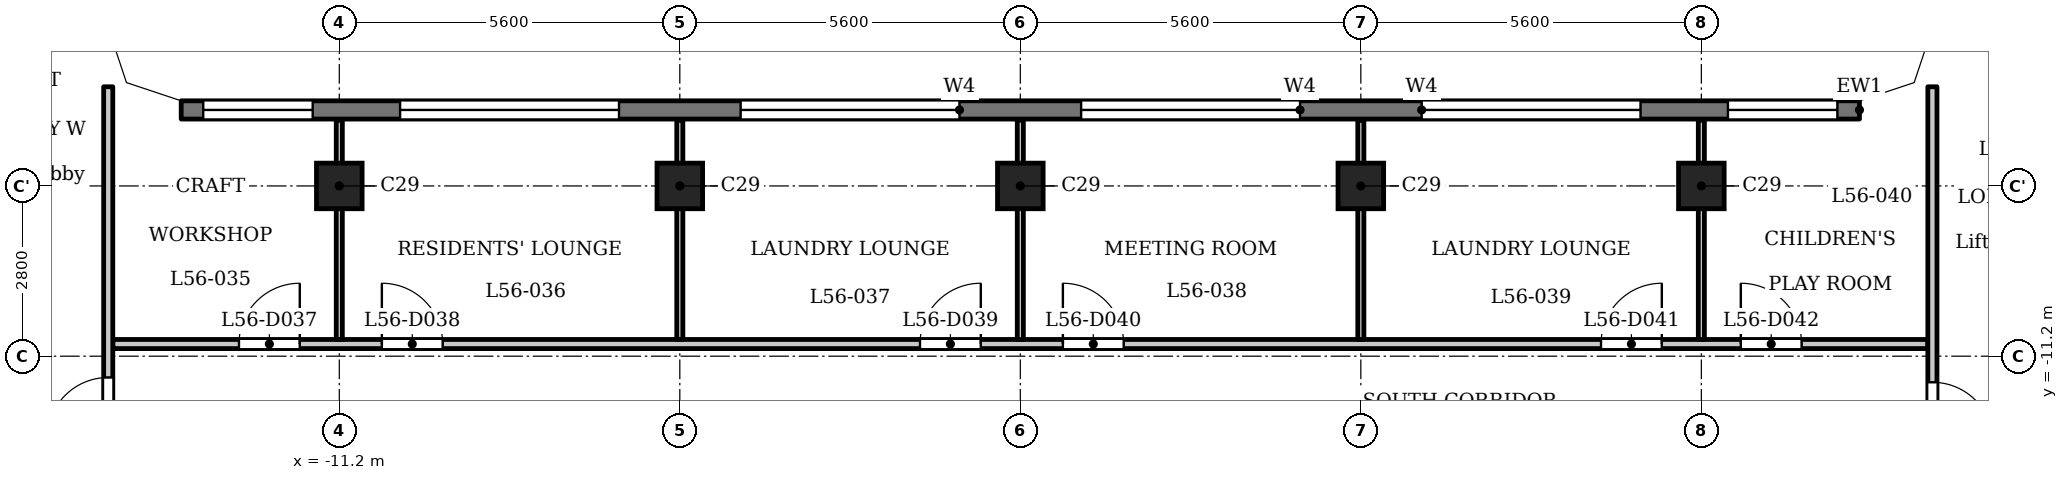
"""IFC4 building model, lengths in metres.
Left out: names, types, materials, properties, quantities, classifications, styles, units other than length and angle.
Written with IfcOpenShell. Run it as: python <this file> out.ifc"""

import sys

from ifc_helpers import new_model, si_unit, direction, frame, frame_2d, origin, origin_2d, place, context, subcontext, project, spatial, polyline, rectangle, outline, extrude, element, fill, save


model = new_model("IFC4")
c1 = context("Model", 3, precision=1e-05, world=origin(), true_north=direction((0.0, 1.0)))
c2 = subcontext(c1, "Body", "Model", "MODEL_VIEW")
j1 = project(units=[si_unit("LENGTHUNIT", "METRE"), si_unit("PLANEANGLEUNIT", "RADIAN")], contexts=[c1])
p1 = place(None, origin())
s1 = spatial("IfcSite", under=j1, at=p1, CompositionType="ELEMENT")
p2 = place(p1, origin())
s2 = spatial("IfcBuilding", under=s1, at=p2, CompositionType="ELEMENT")
p3 = place(p2, frame((0.0, 0.0, 216.9)))
s3 = spatial("IfcBuildingStorey", under=s2, at=p3, CompositionType="ELEMENT", Elevation=216.9)
for number, where, z_axis, x_axis in (
    (1, (-11.2, -8.4, 0.0), (0.0, 0.0, 1.0), (1.0, 0.0, 0.0)),
    (2, (-5.6, -8.4, 0.0), (0.0, 0.0, 1.0), (1.0, 0.0, 0.0)),
    (3, (0.0, -8.4, 0.0), (0.0, 0.0, 1.0), (1.0, 0.0, 0.0)),
    (4, (5.6, -8.4, 0.0), (0.0, 0.0, 1.0), (1.0, 0.0, 0.0)),
    (5, (11.2, -8.4, 0.0), (0.0, 0.0, 1.0), (1.0, 0.0, 0.0)),
):
    element("IfcColumn", number, at=place(p3, frame(where, z_axis=z_axis, x_axis=x_axis)), inside=s3, PredefinedType="COLUMN", context=c2, shape_type="SweptSolid", body=[
        extrude(rectangle(XDim=0.75, YDim=0.75, at=origin_2d()), origin(), (0.0, 0.0, 1.0), 3.5),
    ])
p4 = place(p3, frame((13.8, -7.15, 0.0), z_axis=(0.0, 0.0, 1.0), x_axis=(-1.0, 0.0, 0.0)))
e6 = element("IfcWall", 6, at=p4, inside=s3, PredefinedType="SOLIDWALL", context=c2, shape_type="SweptSolid", body=[
    extrude(rectangle(XDim=27.6, YDim=0.3, at=frame_2d((13.8, 0.0))), origin(), (0.0, 0.0, 1.0), 3.2),
])
p5 = place(p4, frame((0.363, 0.0, 0.9)))
e7 = element("IfcOpeningElement", 7, at=p5, cuts=e6, PredefinedType="OPENING", context=c2, shape_type="SweptSolid", body=[
    extrude(rectangle(XDim=1.8, YDim=1.25, at=frame_2d((0.9, 0.625))), frame((0.0, 0.16, 0.0), z_axis=(0.0, -1.0, 0.0), x_axis=(1.0, 0.0, 0.0)), (0.0, 0.0, 1.0), 0.32),
])
p6 = place(p4, frame((3.6, 0.0, 1.2)))
e8 = element("IfcOpeningElement", 8, at=p6, cuts=e6, PredefinedType="OPENING", context=c2, shape_type="SweptSolid", body=[
    extrude(rectangle(XDim=3.6, YDim=0.95, at=frame_2d((1.8, 0.475))), frame((0.0, 0.16, 0.0), z_axis=(0.0, -1.0, 0.0), x_axis=(1.0, 0.0, 0.0)), (0.0, 0.0, 1.0), 0.32),
])
p7 = place(p4, frame((9.2, 0.0, 1.2)))
e9 = element("IfcOpeningElement", 9, at=p7, cuts=e6, PredefinedType="OPENING", context=c2, shape_type="SweptSolid", body=[
    extrude(rectangle(XDim=3.6, YDim=0.95, at=frame_2d((1.8, 0.475))), frame((0.0, 0.16, 0.0), z_axis=(0.0, -1.0, 0.0), x_axis=(1.0, 0.0, 0.0)), (0.0, 0.0, 1.0), 0.32),
])
p8 = place(p4, frame((14.8, 0.0, 1.2)))
e10 = element("IfcOpeningElement", 10, at=p8, cuts=e6, PredefinedType="OPENING", context=c2, shape_type="SweptSolid", body=[
    extrude(rectangle(XDim=3.6, YDim=0.95, at=frame_2d((1.8, 0.475))), frame((0.0, 0.16, 0.0), z_axis=(0.0, -1.0, 0.0), x_axis=(1.0, 0.0, 0.0)), (0.0, 0.0, 1.0), 0.32),
])
p9 = place(p4, frame((20.4, 0.0, 1.2)))
e11 = element("IfcOpeningElement", 11, at=p9, cuts=e6, PredefinedType="OPENING", context=c2, shape_type="SweptSolid", body=[
    extrude(rectangle(XDim=3.6, YDim=0.95, at=frame_2d((1.8, 0.475))), frame((0.0, 0.16, 0.0), z_axis=(0.0, -1.0, 0.0), x_axis=(1.0, 0.0, 0.0)), (0.0, 0.0, 1.0), 0.32),
])
p10 = place(p4, frame((25.438, 0.0, 0.9)))
e12 = element("IfcOpeningElement", 12, at=p10, cuts=e6, PredefinedType="OPENING", context=c2, shape_type="SweptSolid", body=[
    extrude(rectangle(XDim=1.8, YDim=1.25, at=frame_2d((0.9, 0.625))), frame((0.0, 0.16, 0.0), z_axis=(0.0, -1.0, 0.0), x_axis=(1.0, 0.0, 0.0)), (0.0, 0.0, 1.0), 0.32),
])
p11 = place(p3, frame((-14.925, -11.0, 0.0), z_axis=(0.0, 0.0, 1.0), x_axis=(1.0, 0.0, 0.0)))
e13 = element("IfcWall", 13, at=p11, inside=s3, PredefinedType="PARTITIONING", context=c2, shape_type="SweptSolid", body=[
    extrude(rectangle(XDim=29.85, YDim=0.15, at=frame_2d((14.925, 0.0))), origin(), (0.0, 0.0, 1.0), 3.2),
])
p12 = place(p11, frame((2.075, 0.0, 0.0)))
e14 = element("IfcOpeningElement", 14, at=p12, cuts=e13, PredefinedType="OPENING", context=c2, shape_type="SweptSolid", body=[
    extrude(rectangle(XDim=1.0, YDim=2.1, at=frame_2d((0.5, 1.05))), frame((0.0, 0.085, 0.0), z_axis=(0.0, -1.0, 0.0), x_axis=(1.0, 0.0, 0.0)), (0.0, 0.0, 1.0), 0.17),
])
p13 = place(p11, frame((4.425, 0.0, 0.0)))
e15 = element("IfcOpeningElement", 15, at=p13, cuts=e13, PredefinedType="OPENING", context=c2, shape_type="SweptSolid", body=[
    extrude(rectangle(XDim=1.0, YDim=2.1, at=frame_2d((0.5, 1.05))), frame((0.0, 0.085, 0.0), z_axis=(0.0, -1.0, 0.0), x_axis=(1.0, 0.0, 0.0)), (0.0, 0.0, 1.0), 0.17),
])
p14 = place(p11, frame((13.275, 0.0, 0.0)))
e16 = element("IfcOpeningElement", 16, at=p14, cuts=e13, PredefinedType="OPENING", context=c2, shape_type="SweptSolid", body=[
    extrude(rectangle(XDim=1.0, YDim=2.1, at=frame_2d((0.5, 1.05))), frame((0.0, 0.085, 0.0), z_axis=(0.0, -1.0, 0.0), x_axis=(1.0, 0.0, 0.0)), (0.0, 0.0, 1.0), 0.17),
])
p15 = place(p11, frame((15.625, 0.0, 0.0)))
e17 = element("IfcOpeningElement", 17, at=p15, cuts=e13, PredefinedType="OPENING", context=c2, shape_type="SweptSolid", body=[
    extrude(rectangle(XDim=1.0, YDim=2.1, at=frame_2d((0.5, 1.05))), frame((0.0, 0.085, 0.0), z_axis=(0.0, -1.0, 0.0), x_axis=(1.0, 0.0, 0.0)), (0.0, 0.0, 1.0), 0.17),
])
p16 = place(p11, frame((24.475, 0.0, 0.0)))
e18 = element("IfcOpeningElement", 18, at=p16, cuts=e13, PredefinedType="OPENING", context=c2, shape_type="SweptSolid", body=[
    extrude(rectangle(XDim=1.0, YDim=2.1, at=frame_2d((0.5, 1.05))), frame((0.0, 0.085, 0.0), z_axis=(0.0, -1.0, 0.0), x_axis=(1.0, 0.0, 0.0)), (0.0, 0.0, 1.0), 0.17),
])
p17 = place(p11, frame((26.774, 0.0, 0.0)))
e19 = element("IfcOpeningElement", 19, at=p17, cuts=e13, PredefinedType="OPENING", context=c2, shape_type="SweptSolid", body=[
    extrude(rectangle(XDim=1.0, YDim=2.1, at=frame_2d((0.5, 1.05))), frame((0.0, 0.085, 0.0), z_axis=(0.0, -1.0, 0.0), x_axis=(1.0, 0.0, 0.0)), (0.0, 0.0, 1.0), 0.17),
])
p18 = place(p3, frame((-15.0, -13.125, 0.0), z_axis=(0.0, 0.0, 1.0), x_axis=(0.0, 1.0, 0.0)))
e20 = element("IfcWall", 20, at=p18, inside=s3, PredefinedType="PARTITIONING", context=c2, shape_type="SweptSolid", body=[
    extrude(rectangle(XDim=6.356, YDim=0.15, at=frame_2d((3.178, 0.0))), origin(), (0.0, 0.0, 1.0), 3.2),
])
p19 = place(p18, frame((0.575, 0.0, 0.0)))
e21 = element("IfcOpeningElement", 21, at=p19, cuts=e20, PredefinedType="OPENING", context=c2, shape_type="SweptSolid", body=[
    extrude(rectangle(XDim=1.0, YDim=2.1, at=frame_2d((0.5, 1.05))), frame((0.0, 0.085, 0.0), z_axis=(0.0, -1.0, 0.0), x_axis=(1.0, 0.0, 0.0)), (0.0, 0.0, 1.0), 0.17),
])
for number, where, z_axis, x_axis in (
    (22, (-11.2, -10.925, 0.0), (0.0, 0.0, 1.0), (0.0, 1.0, 0.0)),
    (23, (-5.6, -10.925, 0.0), (0.0, 0.0, 1.0), (0.0, 1.0, 0.0)),
    (24, (0.0, -10.925, 0.0), (0.0, 0.0, 1.0), (0.0, 1.0, 0.0)),
    (25, (5.6, -10.925, 0.0), (0.0, 0.0, 1.0), (0.0, 1.0, 0.0)),
    (26, (11.2, -10.925, 0.0), (0.0, 0.0, 1.0), (0.0, 1.0, 0.0)),
):
    element("IfcWall", number, at=place(p3, frame(where, z_axis=z_axis, x_axis=x_axis)), inside=s3, PredefinedType="PARTITIONING", context=c2, shape_type="SweptSolid", body=[
        extrude(rectangle(XDim=3.605, YDim=0.1, at=frame_2d((1.802, 0.0))), origin(), (0.0, 0.0, 1.0), 3.2),
    ])
p20 = place(p3, frame((15.0, -13.125, 0.0), z_axis=(0.0, 0.0, 1.0), x_axis=(0.0, 1.0, 0.0)))
e27 = element("IfcWall", 27, at=p20, inside=s3, PredefinedType="PARTITIONING", context=c2, shape_type="SweptSolid", body=[
    extrude(rectangle(XDim=6.356, YDim=0.15, at=frame_2d((3.178, 0.0))), origin(), (0.0, 0.0, 1.0), 3.2),
])
p21 = place(p20, frame((0.496, 0.0, 0.0)))
e28 = element("IfcOpeningElement", 28, at=p21, cuts=e27, PredefinedType="OPENING", context=c2, shape_type="SweptSolid", body=[
    extrude(rectangle(XDim=1.0, YDim=2.1, at=frame_2d((0.5, 1.05))), frame((0.0, 0.085, 0.0), z_axis=(0.0, -1.0, 0.0), x_axis=(1.0, 0.0, 0.0)), (0.0, 0.0, 1.0), 0.17),
])
p22 = place(p3, origin())
e29 = element("IfcWall", 29, at=p22, inside=s3, PredefinedType="SOLIDWALL", context=c2, shape_type="SweptSolid", body=[
    extrude(outline(polyline([(14.937, -6.937), (15.3, -5.849), (15.3, -5.8), (15.0, -5.8), (14.7, -6.7), (13.8, -7.0), (13.8, -7.3), (13.849, -7.3), (14.937, -6.937)])), origin(), (0.0, 0.0, 1.0), 3.2),
])
e30 = element("IfcWall", 30, at=p22, inside=s3, PredefinedType="SOLIDWALL", context=c2, shape_type="SweptSolid", body=[
    extrude(outline(polyline([(-14.937, -6.937), (-13.849, -7.3), (-13.8, -7.3), (-13.8, -7.0), (-14.7, -6.7), (-15.0, -5.8), (-15.3, -5.8), (-15.3, -5.849), (-14.937, -6.937)])), origin(), (0.0, 0.0, 1.0), 3.2),
])
p23 = place(p19, origin())
e31 = element("IfcDoor", 31, at=p23, inside=s3, OperationType="SINGLE_SWING_RIGHT", PredefinedType="DOOR", context=c2, shape_type="SweptSolid", body=[
    extrude(rectangle(XDim=1.0, YDim=2.1, at=frame_2d((0.5, 1.05))), frame((0.0, 0.025, 0.0), z_axis=(0.0, -1.0, 0.0), x_axis=(1.0, 0.0, 0.0)), (0.0, 0.0, 1.0), 0.05),
])
fill(e21, e31)
p24 = place(p21, origin())
e32 = element("IfcDoor", 32, at=p24, inside=s3, OperationType="SINGLE_SWING_LEFT", PredefinedType="DOOR", context=c2, shape_type="SweptSolid", body=[
    extrude(rectangle(XDim=1.0, YDim=2.1, at=frame_2d((0.5, 1.05))), frame((0.0, 0.025, 0.0), z_axis=(0.0, -1.0, 0.0), x_axis=(1.0, 0.0, 0.0)), (0.0, 0.0, 1.0), 0.05),
])
fill(e28, e32)
p25 = place(p12, origin())
e33 = element("IfcDoor", 33, at=p25, inside=s3, OperationType="SINGLE_SWING_LEFT", PredefinedType="DOOR", context=c2, shape_type="SweptSolid", body=[
    extrude(rectangle(XDim=1.0, YDim=2.1, at=frame_2d((0.5, 1.05))), frame((0.0, 0.025, 0.0), z_axis=(0.0, -1.0, 0.0), x_axis=(1.0, 0.0, 0.0)), (0.0, 0.0, 1.0), 0.05),
])
fill(e14, e33)
p26 = place(p13, origin())
e34 = element("IfcDoor", 34, at=p26, inside=s3, OperationType="SINGLE_SWING_RIGHT", PredefinedType="DOOR", context=c2, shape_type="SweptSolid", body=[
    extrude(rectangle(XDim=1.0, YDim=2.1, at=frame_2d((0.5, 1.05))), frame((0.0, 0.025, 0.0), z_axis=(0.0, -1.0, 0.0), x_axis=(1.0, 0.0, 0.0)), (0.0, 0.0, 1.0), 0.05),
])
fill(e15, e34)
p27 = place(p14, origin())
e35 = element("IfcDoor", 35, at=p27, inside=s3, OperationType="SINGLE_SWING_LEFT", PredefinedType="DOOR", context=c2, shape_type="SweptSolid", body=[
    extrude(rectangle(XDim=1.0, YDim=2.1, at=frame_2d((0.5, 1.05))), frame((0.0, 0.025, 0.0), z_axis=(0.0, -1.0, 0.0), x_axis=(1.0, 0.0, 0.0)), (0.0, 0.0, 1.0), 0.05),
])
fill(e16, e35)
p28 = place(p15, origin())
e36 = element("IfcDoor", 36, at=p28, inside=s3, OperationType="SINGLE_SWING_RIGHT", PredefinedType="DOOR", context=c2, shape_type="SweptSolid", body=[
    extrude(rectangle(XDim=1.0, YDim=2.1, at=frame_2d((0.5, 1.05))), frame((0.0, 0.025, 0.0), z_axis=(0.0, -1.0, 0.0), x_axis=(1.0, 0.0, 0.0)), (0.0, 0.0, 1.0), 0.05),
])
fill(e17, e36)
p29 = place(p16, origin())
e37 = element("IfcDoor", 37, at=p29, inside=s3, OperationType="SINGLE_SWING_LEFT", PredefinedType="DOOR", context=c2, shape_type="SweptSolid", body=[
    extrude(rectangle(XDim=1.0, YDim=2.1, at=frame_2d((0.5, 1.05))), frame((0.0, 0.025, 0.0), z_axis=(0.0, -1.0, 0.0), x_axis=(1.0, 0.0, 0.0)), (0.0, 0.0, 1.0), 0.05),
])
fill(e18, e37)
p30 = place(p17, origin())
e38 = element("IfcDoor", 38, at=p30, inside=s3, OperationType="SINGLE_SWING_RIGHT", PredefinedType="DOOR", context=c2, shape_type="SweptSolid", body=[
    extrude(rectangle(XDim=1.0, YDim=2.1, at=frame_2d((0.5, 1.05))), frame((0.0, 0.025, 0.0), z_axis=(0.0, -1.0, 0.0), x_axis=(1.0, 0.0, 0.0)), (0.0, 0.0, 1.0), 0.05),
])
fill(e19, e38)
p31 = place(p5, origin())
e39 = element("IfcWindow", 39, at=p31, inside=s3, PartitioningType="SINGLE_PANEL", PredefinedType="WINDOW", context=c2, shape_type="SweptSolid", body=[
    extrude(rectangle(XDim=1.8, YDim=1.25, at=frame_2d((0.9, 0.625))), frame((0.0, 0.03, 0.0), z_axis=(0.0, -1.0, 0.0), x_axis=(1.0, 0.0, 0.0)), (0.0, 0.0, 1.0), 0.06),
])
fill(e7, e39)
p32 = place(p6, origin())
e40 = element("IfcWindow", 40, at=p32, inside=s3, PartitioningType="SINGLE_PANEL", PredefinedType="WINDOW", context=c2, shape_type="SweptSolid", body=[
    extrude(rectangle(XDim=3.6, YDim=0.95, at=frame_2d((1.8, 0.475))), frame((0.0, 0.03, 0.0), z_axis=(0.0, -1.0, 0.0), x_axis=(1.0, 0.0, 0.0)), (0.0, 0.0, 1.0), 0.06),
])
fill(e8, e40)
p33 = place(p7, origin())
e41 = element("IfcWindow", 41, at=p33, inside=s3, PartitioningType="SINGLE_PANEL", PredefinedType="WINDOW", context=c2, shape_type="SweptSolid", body=[
    extrude(rectangle(XDim=3.6, YDim=0.95, at=frame_2d((1.8, 0.475))), frame((0.0, 0.03, 0.0), z_axis=(0.0, -1.0, 0.0), x_axis=(1.0, 0.0, 0.0)), (0.0, 0.0, 1.0), 0.06),
])
fill(e9, e41)
p34 = place(p8, origin())
e42 = element("IfcWindow", 42, at=p34, inside=s3, PartitioningType="SINGLE_PANEL", PredefinedType="WINDOW", context=c2, shape_type="SweptSolid", body=[
    extrude(rectangle(XDim=3.6, YDim=0.95, at=frame_2d((1.8, 0.475))), frame((0.0, 0.03, 0.0), z_axis=(0.0, -1.0, 0.0), x_axis=(1.0, 0.0, 0.0)), (0.0, 0.0, 1.0), 0.06),
])
fill(e10, e42)
p35 = place(p9, origin())
e43 = element("IfcWindow", 43, at=p35, inside=s3, PartitioningType="SINGLE_PANEL", PredefinedType="WINDOW", context=c2, shape_type="SweptSolid", body=[
    extrude(rectangle(XDim=3.6, YDim=0.95, at=frame_2d((1.8, 0.475))), frame((0.0, 0.03, 0.0), z_axis=(0.0, -1.0, 0.0), x_axis=(1.0, 0.0, 0.0)), (0.0, 0.0, 1.0), 0.06),
])
fill(e11, e43)
p36 = place(p10, origin())
e44 = element("IfcWindow", 44, at=p36, inside=s3, PartitioningType="SINGLE_PANEL", PredefinedType="WINDOW", context=c2, shape_type="SweptSolid", body=[
    extrude(rectangle(XDim=1.8, YDim=1.25, at=frame_2d((0.9, 0.625))), frame((0.0, 0.03, 0.0), z_axis=(0.0, -1.0, 0.0), x_axis=(1.0, 0.0, 0.0)), (0.0, 0.0, 1.0), 0.06),
])
fill(e12, e44)
save(model, sys.argv[1])
